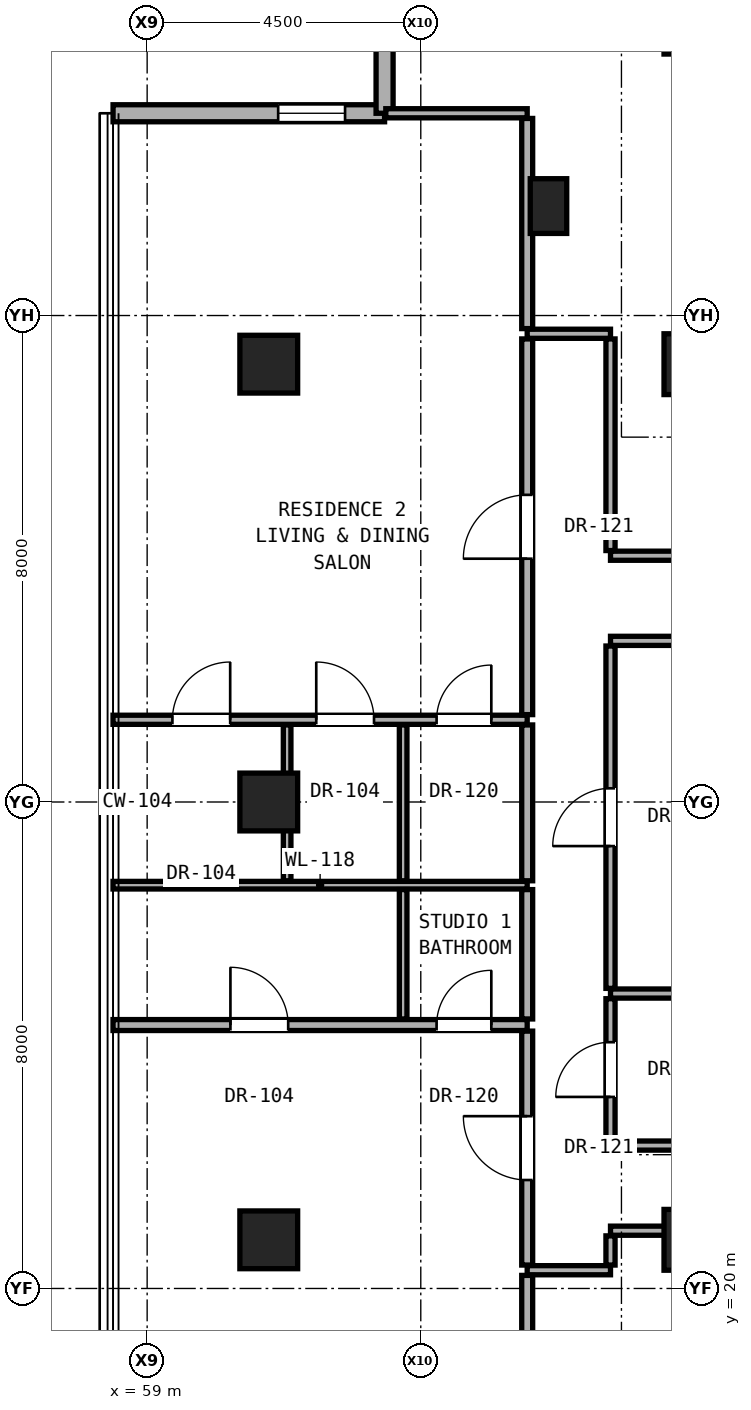
"""IFC4 building model, lengths in metres.
Left out: names, types, materials, properties, quantities, classifications, styles, units other than length and angle.
Written with IfcOpenShell. Run it as: python <this file> out.ifc"""

import sys

from ifc_helpers import new_model, si_unit, direction, frame, frame_2d, origin, origin_2d, place, context, subcontext, project, spatial, rectangle, hollow_rectangle, extrude, element, fill, save


model = new_model("IFC4")
c1 = context("Model", 3, precision=1e-05, world=origin(), true_north=direction((0.0, 1.0)))
c2 = subcontext(c1, "Body", "Model", "MODEL_VIEW")
j1 = project(units=[si_unit("LENGTHUNIT", "METRE"), si_unit("PLANEANGLEUNIT", "RADIAN")], contexts=[c1])
p1 = place(None, origin())
s1 = spatial("IfcSite", under=j1, at=p1, CompositionType="ELEMENT")
p2 = place(p1, origin())
s2 = spatial("IfcBuilding", under=s1, at=p2, CompositionType="ELEMENT")
p3 = place(p2, frame((0.0, 0.0, 173.9)))
s3 = spatial("IfcBuildingStorey", under=s2, at=p3, CompositionType="ELEMENT", Elevation=173.9)
for number, where, z_axis, x_axis in (
    (1, (68.0, 20.8, 0.0), (0.0, 0.0, 1.0), (1.0, 0.0, 0.0)),
    (2, (68.0, 35.2, 0.0), (0.0, 0.0, 1.0), (1.0, 0.0, 0.0)),
    (3, (68.0, 40.8, 0.0), (0.0, 0.0, 1.0), (1.0, 0.0, 0.0)),
):
    element("IfcColumn", number, at=place(p3, frame(where, z_axis=z_axis, x_axis=x_axis)), inside=s3, PredefinedType="COLUMN", context=c2, shape_type="SweptSolid", body=[
        extrude(rectangle(XDim=1.0, YDim=1.0, at=origin_2d()), origin(), (0.0, 0.0, 1.0), 3.25),
    ])
for number, where, z_axis, x_axis in (
    (4, (61.0, 20.8, 0.0), (0.0, 0.0, 1.0), (1.0, 0.0, 0.0)),
    (5, (61.0, 28.0, 0.0), (0.0, 0.0, 1.0), (1.0, 0.0, 0.0)),
    (6, (61.0, 35.2, 0.0), (0.0, 0.0, 1.0), (1.0, 0.0, 0.0)),
):
    element("IfcColumn", number, at=place(p3, frame(where, z_axis=z_axis, x_axis=x_axis)), inside=s3, PredefinedType="COLUMN", context=c2, shape_type="SweptSolid", body=[
        extrude(hollow_rectangle(XDim=0.95, YDim=0.95, WallThickness=0.05, at=origin_2d()), origin(), (0.0, 0.0, 1.0), 3.25),
    ])
p4 = place(p3, frame((65.6, 37.8, 0.0), z_axis=(0.0, 0.0, 1.0), x_axis=(1.0, 0.0, 0.0)))
e7 = element("IfcColumn", 7, at=p4, inside=s3, PredefinedType="PILASTER", context=c2, shape_type="SweptSolid", body=[
    extrude(rectangle(XDim=0.6, YDim=0.9, at=origin_2d()), origin(), (0.0, 0.0, 1.0), 3.25),
])
p5 = place(p3, frame((62.905, 39.326, 0.0), z_axis=(0.0, 0.0, 1.0), x_axis=(-1.0, 0.0, 0.0)))
e8 = element("IfcWall", 8, at=p5, inside=s3, PredefinedType="SOLIDWALL", context=c2, shape_type="SweptSolid", body=[
    extrude(rectangle(XDim=4.465, YDim=0.28, at=frame_2d((2.233, 0.0))), origin(), (0.0, 0.0, 1.0), 3.03),
])
p6 = place(p5, frame((0.65, 0.0, 0.85)))
e9 = element("IfcOpeningElement", 9, at=p6, cuts=e8, PredefinedType="OPENING", context=c2, shape_type="SweptSolid", body=[
    extrude(rectangle(XDim=1.1, YDim=2.0, at=frame_2d((0.55, 1.0))), frame((0.0, 0.15, 0.0), z_axis=(0.0, -1.0, 0.0), x_axis=(1.0, 0.0, 0.0)), (0.0, 0.0, 1.0), 0.3),
])
p7 = place(p3, frame((62.905, 43.791, 0.0), z_axis=(0.0, 0.0, 1.0), x_axis=(0.0, -1.0, 0.0)))
e10 = element("IfcWall", 10, at=p7, inside=s3, PredefinedType="SOLIDWALL", context=c2, shape_type="SweptSolid", body=[
    extrude(rectangle(XDim=4.465, YDim=0.28, at=frame_2d((2.232, 0.0))), origin(), (0.0, 0.0, 1.0), 3.03),
])
p8 = place(p3, frame((65.25, 20.3, 0.0), z_axis=(0.0, 0.0, 1.0), x_axis=(1.0, 0.0, 0.0)))
e11 = element("IfcWall", 11, at=p8, inside=s3, PredefinedType="PARTITIONING", context=c2, shape_type="SweptSolid", body=[
    extrude(rectangle(XDim=1.37, YDim=0.15, at=frame_2d((0.685, 0.0))), origin(), (0.0, 0.0, 1.0), 3.05),
])
p9 = place(p3, frame((66.62, 20.95, 0.0), z_axis=(0.0, 0.0, 1.0), x_axis=(1.0, 0.0, 0.0)))
e12 = element("IfcWall", 12, at=p9, inside=s3, PredefinedType="PARTITIONING", context=c2, shape_type="SweptSolid", body=[
    extrude(rectangle(XDim=1.11, YDim=0.15, at=frame_2d((0.555, 0.0))), origin(), (0.0, 0.0, 1.0), 2.442),
])
p10 = place(p3, frame((66.62, 22.35, 0.0), z_axis=(0.0, 0.0, 1.0), x_axis=(1.0, 0.0, 0.0)))
e13 = element("IfcWall", 13, at=p10, inside=s3, PredefinedType="PARTITIONING", context=c2, shape_type="SweptSolid", body=[
    extrude(rectangle(XDim=10.14, YDim=0.15, at=frame_2d((5.07, 0.0))), origin(), (0.0, 0.0, 1.0), 2.186),
])
p11 = place(p3, frame((58.439, 24.332, 0.0), z_axis=(0.0, 0.0, 1.0), x_axis=(1.0, 0.0, 0.0)))
e14 = element("IfcWall", 14, at=p11, inside=s3, PredefinedType="PARTITIONING", context=c2, shape_type="SweptSolid", body=[
    extrude(rectangle(XDim=6.811, YDim=0.18, at=frame_2d((3.406, 0.0))), origin(), (0.0, 0.0, 1.0), 2.269),
])
p12 = place(p11, frame((1.93, 0.0, 0.0)))
e15 = element("IfcOpeningElement", 15, at=p12, cuts=e14, PredefinedType="OPENING", context=c2, shape_type="SweptSolid", body=[
    extrude(rectangle(XDim=0.95, YDim=2.15, at=frame_2d((0.475, 1.075))), frame((0.0, 0.1, 0.0), z_axis=(0.0, -1.0, 0.0), x_axis=(1.0, 0.0, 0.0)), (0.0, 0.0, 1.0), 0.2),
])
p13 = place(p11, frame((5.321, 0.0, 0.0)))
e16 = element("IfcOpeningElement", 16, at=p13, cuts=e14, PredefinedType="OPENING", context=c2, shape_type="SweptSolid", body=[
    extrude(rectangle(XDim=0.9, YDim=2.1, at=frame_2d((0.45, 1.05))), frame((0.0, 0.1, 0.0), z_axis=(0.0, -1.0, 0.0), x_axis=(1.0, 0.0, 0.0)), (0.0, 0.0, 1.0), 0.2),
])
p14 = place(p3, frame((66.62, 24.85, 0.0), z_axis=(0.0, 0.0, 1.0), x_axis=(1.0, 0.0, 0.0)))
e17 = element("IfcWall", 17, at=p14, inside=s3, PredefinedType="PARTITIONING", context=c2, shape_type="SweptSolid", body=[
    extrude(rectangle(XDim=3.13, YDim=0.15, at=frame_2d((1.565, 0.0))), origin(), (0.0, 0.0, 1.0), 2.186),
])
p15 = place(p3, frame((58.439, 26.632, 0.0), z_axis=(0.0, 0.0, 1.0), x_axis=(1.0, 0.0, 0.0)))
e18 = element("IfcWall", 18, at=p15, inside=s3, PredefinedType="PARTITIONING", context=c2, shape_type="SweptSolid", body=[
    extrude(rectangle(XDim=6.811, YDim=0.125, at=frame_2d((3.406, 0.0))), origin(), (0.0, 0.0, 1.0), 2.269),
])
p16 = place(p3, frame((58.439, 29.352, 0.0), z_axis=(0.0, 0.0, 1.0), x_axis=(1.0, 0.0, 0.0)))
e19 = element("IfcWall", 19, at=p16, inside=s3, PredefinedType="PARTITIONING", context=c2, shape_type="SweptSolid", body=[
    extrude(rectangle(XDim=6.811, YDim=0.15, at=frame_2d((3.406, 0.0))), origin(), (0.0, 0.0, 1.0), 2.269),
])
p17 = place(p16, frame((0.977, 0.0, 0.0)))
e20 = element("IfcOpeningElement", 20, at=p17, cuts=e19, PredefinedType="OPENING", context=c2, shape_type="SweptSolid", body=[
    extrude(rectangle(XDim=0.95, YDim=2.15, at=frame_2d((0.475, 1.075))), frame((0.0, 0.085, 0.0), z_axis=(0.0, -1.0, 0.0), x_axis=(1.0, 0.0, 0.0)), (0.0, 0.0, 1.0), 0.17),
])
p18 = place(p16, frame((3.342, 0.0, 0.0)))
e21 = element("IfcOpeningElement", 21, at=p18, cuts=e19, PredefinedType="OPENING", context=c2, shape_type="SweptSolid", body=[
    extrude(rectangle(XDim=0.95, YDim=2.15, at=frame_2d((0.475, 1.075))), frame((0.0, 0.085, 0.0), z_axis=(0.0, -1.0, 0.0), x_axis=(1.0, 0.0, 0.0)), (0.0, 0.0, 1.0), 0.17),
])
p19 = place(p16, frame((5.321, 0.0, 0.0)))
e22 = element("IfcOpeningElement", 22, at=p19, cuts=e19, PredefinedType="OPENING", context=c2, shape_type="SweptSolid", body=[
    extrude(rectangle(XDim=0.9, YDim=2.1, at=frame_2d((0.45, 1.05))), frame((0.0, 0.085, 0.0), z_axis=(0.0, -1.0, 0.0), x_axis=(1.0, 0.0, 0.0)), (0.0, 0.0, 1.0), 0.17),
])
p20 = place(p3, frame((66.62, 30.65, 0.0), z_axis=(0.0, 0.0, 1.0), x_axis=(1.0, 0.0, 0.0)))
e23 = element("IfcWall", 23, at=p20, inside=s3, PredefinedType="PARTITIONING", context=c2, shape_type="SweptSolid", body=[
    extrude(rectangle(XDim=10.14, YDim=0.15, at=frame_2d((5.07, 0.0))), origin(), (0.0, 0.0, 1.0), 2.186),
])
p21 = place(p20, frame((6.14, 0.0, 0.0)))
e24 = element("IfcOpeningElement", 24, at=p21, cuts=e23, PredefinedType="OPENING", context=c2, shape_type="SweptSolid", body=[
    extrude(rectangle(XDim=0.95, YDim=2.15, at=frame_2d((0.475, 1.075))), frame((0.0, 0.085, 0.0), z_axis=(0.0, -1.0, 0.0), x_axis=(1.0, 0.0, 0.0)), (0.0, 0.0, 1.0), 0.17),
])
p22 = place(p3, frame((66.62, 32.05, 0.0), z_axis=(0.0, 0.0, 1.0), x_axis=(1.0, 0.0, 0.0)))
e25 = element("IfcWall", 25, at=p22, inside=s3, PredefinedType="PARTITIONING", context=c2, shape_type="SweptSolid", body=[
    extrude(rectangle(XDim=2.18, YDim=0.15, at=frame_2d((1.09, 0.0))), origin(), (0.0, 0.0, 1.0), 2.186),
])
p23 = place(p3, frame((65.25, 35.7, 0.0), z_axis=(0.0, 0.0, 1.0), x_axis=(1.0, 0.0, 0.0)))
e26 = element("IfcWall", 26, at=p23, inside=s3, PredefinedType="PARTITIONING", context=c2, shape_type="SweptSolid", body=[
    extrude(rectangle(XDim=1.37, YDim=0.15, at=frame_2d((0.685, 0.0))), origin(), (0.0, 0.0, 1.0), 3.05),
])
p24 = place(p3, frame((62.925, 39.326, 0.0), z_axis=(0.0, 0.0, 1.0), x_axis=(1.0, 0.0, 0.0)))
e27 = element("IfcWall", 27, at=p24, inside=s3, PredefinedType="PARTITIONING", context=c2, shape_type="SweptSolid", body=[
    extrude(rectangle(XDim=2.325, YDim=0.15, at=frame_2d((1.163, 0.0))), origin(), (0.0, 0.0, 1.0), 3.05),
])
p25 = place(p3, frame((61.302, 26.705, 0.0), z_axis=(0.0, 0.0, 1.0), x_axis=(0.0, 1.0, 0.0)))
e28 = element("IfcWall", 28, at=p25, inside=s3, PredefinedType="PARTITIONING", context=c2, shape_type="SweptSolid", body=[
    extrude(rectangle(XDim=2.562, YDim=0.125, at=frame_2d((1.281, 0.0))), origin(), (0.0, 0.0, 1.0), 2.346),
])
p26 = place(p3, frame((63.21, 24.432, 0.0), z_axis=(0.0, 0.0, 1.0), x_axis=(0.0, 1.0, 0.0)))
e29 = element("IfcWall", 29, at=p26, inside=s3, PredefinedType="PARTITIONING", context=c2, shape_type="SweptSolid", body=[
    extrude(rectangle(XDim=2.128, YDim=0.125, at=frame_2d((1.064, 0.0))), origin(), (0.0, 0.0, 1.0), 3.05),
])
p27 = place(p3, frame((63.21, 26.705, 0.0), z_axis=(0.0, 0.0, 1.0), x_axis=(0.0, 1.0, 0.0)))
e30 = element("IfcWall", 30, at=p27, inside=s3, PredefinedType="PARTITIONING", context=c2, shape_type="SweptSolid", body=[
    extrude(rectangle(XDim=2.562, YDim=0.125, at=frame_2d((1.281, 0.0))), origin(), (0.0, 0.0, 1.0), 2.346),
])
p28 = place(p3, frame((65.25, 16.774, 0.0), z_axis=(0.0, 0.0, 1.0), x_axis=(0.0, 1.0, 0.0)))
e31 = element("IfcWall", 31, at=p28, inside=s3, PredefinedType="PARTITIONING", context=c2, shape_type="SweptSolid", body=[
    extrude(rectangle(XDim=3.441, YDim=0.18, at=frame_2d((1.721, 0.0))), origin(), (0.0, 0.0, 1.0), 2.493),
])
p29 = place(p3, frame((65.25, 20.385, 0.0), z_axis=(0.0, 0.0, 1.0), x_axis=(0.0, 1.0, 0.0)))
e32 = element("IfcWall", 32, at=p29, inside=s3, PredefinedType="PARTITIONING", context=c2, shape_type="SweptSolid", body=[
    extrude(rectangle(XDim=3.847, YDim=0.18, at=frame_2d((1.923, 0.0))), origin(), (0.0, 0.0, 1.0), 2.442),
])
p30 = place(p29, frame((1.398, 0.0, 0.0)))
e33 = element("IfcOpeningElement", 33, at=p30, cuts=e32, PredefinedType="OPENING", context=c2, shape_type="SweptSolid", body=[
    extrude(rectangle(XDim=1.05, YDim=2.2, at=frame_2d((0.525, 1.1))), frame((0.0, 0.1, 0.0), z_axis=(0.0, -1.0, 0.0), x_axis=(1.0, 0.0, 0.0)), (0.0, 0.0, 1.0), 0.2),
])
p31 = place(p3, frame((65.25, 24.432, 0.0), z_axis=(0.0, 0.0, 1.0), x_axis=(0.0, 1.0, 0.0)))
e34 = element("IfcWall", 34, at=p31, inside=s3, PredefinedType="PARTITIONING", context=c2, shape_type="SweptSolid", body=[
    extrude(rectangle(XDim=2.128, YDim=0.18, at=frame_2d((1.064, 0.0))), origin(), (0.0, 0.0, 1.0), 3.05),
])
p32 = place(p3, frame((65.25, 26.705, 0.0), z_axis=(0.0, 0.0, 1.0), x_axis=(0.0, 1.0, 0.0)))
e35 = element("IfcWall", 35, at=p32, inside=s3, PredefinedType="PARTITIONING", context=c2, shape_type="SweptSolid", body=[
    extrude(rectangle(XDim=2.562, YDim=0.18, at=frame_2d((1.281, 0.0))), origin(), (0.0, 0.0, 1.0), 2.346),
])
p33 = place(p3, frame((65.25, 29.437, 0.0), z_axis=(0.0, 0.0, 1.0), x_axis=(0.0, 1.0, 0.0)))
e36 = element("IfcWall", 36, at=p33, inside=s3, PredefinedType="PARTITIONING", context=c2, shape_type="SweptSolid", body=[
    extrude(rectangle(XDim=6.178, YDim=0.18, at=frame_2d((3.089, 0.0))), origin(), (0.0, 0.0, 1.0), 2.442),
])
p34 = place(p33, frame((2.564, 0.0, 0.0)))
e37 = element("IfcOpeningElement", 37, at=p34, cuts=e36, PredefinedType="OPENING", context=c2, shape_type="SweptSolid", body=[
    extrude(rectangle(XDim=1.05, YDim=2.2, at=frame_2d((0.525, 1.1))), frame((0.0, 0.1, 0.0), z_axis=(0.0, -1.0, 0.0), x_axis=(1.0, 0.0, 0.0)), (0.0, 0.0, 1.0), 0.2),
])
p35 = place(p3, frame((65.25, 35.785, 0.0), z_axis=(0.0, 0.0, 1.0), x_axis=(0.0, 1.0, 0.0)))
e38 = element("IfcWall", 38, at=p35, inside=s3, PredefinedType="PARTITIONING", context=c2, shape_type="SweptSolid", body=[
    extrude(rectangle(XDim=3.456, YDim=0.18, at=frame_2d((1.728, 0.0))), origin(), (0.0, 0.0, 1.0), 2.493),
])
p36 = place(p3, frame((66.62, 20.385, 0.0), z_axis=(0.0, 0.0, 1.0), x_axis=(0.0, 1.0, 0.0)))
e39 = element("IfcWall", 39, at=p36, inside=s3, PredefinedType="PARTITIONING", context=c2, shape_type="SweptSolid", body=[
    extrude(rectangle(XDim=0.48, YDim=0.15, at=frame_2d((0.24, 0.0))), origin(), (0.0, 0.0, 1.0), 2.442),
])
p37 = place(p3, frame((66.62, 22.435, 0.0), z_axis=(0.0, 0.0, 1.0), x_axis=(0.0, 1.0, 0.0)))
e40 = element("IfcWall", 40, at=p37, inside=s3, PredefinedType="PARTITIONING", context=c2, shape_type="SweptSolid", body=[
    extrude(rectangle(XDim=2.33, YDim=0.15, at=frame_2d((1.165, 0.0))), origin(), (0.0, 0.0, 1.0), 3.05),
])
p38 = place(p37, frame((0.715, 0.0, 0.0)))
e41 = element("IfcOpeningElement", 41, at=p38, cuts=e40, PredefinedType="OPENING", context=c2, shape_type="SweptSolid", body=[
    extrude(rectangle(XDim=0.9, YDim=2.1, at=frame_2d((0.45, 1.05))), frame((0.0, 0.085, 0.0), z_axis=(0.0, -1.0, 0.0), x_axis=(1.0, 0.0, 0.0)), (0.0, 0.0, 1.0), 0.17),
])
p39 = place(p3, frame((66.62, 24.935, 0.0), z_axis=(0.0, 0.0, 1.0), x_axis=(0.0, 1.0, 0.0)))
e42 = element("IfcWall", 42, at=p39, inside=s3, PredefinedType="PARTITIONING", context=c2, shape_type="SweptSolid", body=[
    extrude(rectangle(XDim=5.63, YDim=0.15, at=frame_2d((2.815, 0.0))), origin(), (0.0, 0.0, 1.0), 2.346),
])
p40 = place(p39, frame((2.34, 0.0, 0.0)))
e43 = element("IfcOpeningElement", 43, at=p40, cuts=e42, PredefinedType="OPENING", context=c2, shape_type="SweptSolid", body=[
    extrude(rectangle(XDim=0.95, YDim=2.15, at=frame_2d((0.475, 1.075))), frame((0.0, 0.085, 0.0), z_axis=(0.0, -1.0, 0.0), x_axis=(1.0, 0.0, 0.0)), (0.0, 0.0, 1.0), 0.17),
])
p41 = place(p3, frame((66.62, 32.135, 0.0), z_axis=(0.0, 0.0, 1.0), x_axis=(0.0, 1.0, 0.0)))
e44 = element("IfcWall", 44, at=p41, inside=s3, PredefinedType="PARTITIONING", context=c2, shape_type="SweptSolid", body=[
    extrude(rectangle(XDim=3.48, YDim=0.15, at=frame_2d((1.74, 0.0))), origin(), (0.0, 0.0, 1.0), 2.442),
])
p42 = place(p6, origin())
e45 = element("IfcWindow", 45, at=p42, inside=s3, PartitioningType="SINGLE_PANEL", PredefinedType="WINDOW", context=c2, shape_type="SweptSolid", body=[
    extrude(rectangle(XDim=1.1, YDim=2.0, at=frame_2d((0.55, 1.0))), frame((0.0, 0.03, 0.0), z_axis=(0.0, -1.0, 0.0), x_axis=(1.0, 0.0, 0.0)), (0.0, 0.0, 1.0), 0.06),
])
fill(e9, e45)
p43 = place(p38, origin())
e46 = element("IfcDoor", 46, at=p43, inside=s3, OperationType="SINGLE_SWING_LEFT", PredefinedType="DOOR", context=c2, shape_type="SweptSolid", body=[
    extrude(rectangle(XDim=0.9, YDim=2.1, at=frame_2d((0.45, 1.05))), frame((0.0, 0.025, 0.0), z_axis=(0.0, -1.0, 0.0), x_axis=(1.0, 0.0, 0.0)), (0.0, 0.0, 1.0), 0.05),
])
fill(e41, e46)
p44 = place(p30, origin())
e47 = element("IfcDoor", 47, at=p44, inside=s3, OperationType="SINGLE_SWING_RIGHT", PredefinedType="DOOR", context=c2, shape_type="SweptSolid", body=[
    extrude(rectangle(XDim=1.05, YDim=2.2, at=frame_2d((0.525, 1.1))), frame((0.0, 0.025, 0.0), z_axis=(0.0, -1.0, 0.0), x_axis=(1.0, 0.0, 0.0)), (0.0, 0.0, 1.0), 0.05),
])
fill(e33, e47)
p45 = place(p12, origin())
e48 = element("IfcDoor", 48, at=p45, inside=s3, OperationType="SINGLE_SWING_LEFT", PredefinedType="DOOR", context=c2, shape_type="SweptSolid", body=[
    extrude(rectangle(XDim=0.95, YDim=2.15, at=frame_2d((0.475, 1.075))), frame((0.0, 0.025, 0.0), z_axis=(0.0, -1.0, 0.0), x_axis=(1.0, 0.0, 0.0)), (0.0, 0.0, 1.0), 0.05),
])
fill(e15, e48)
p46 = place(p13, origin())
e49 = element("IfcDoor", 49, at=p46, inside=s3, OperationType="SINGLE_SWING_RIGHT", PredefinedType="DOOR", context=c2, shape_type="SweptSolid", body=[
    extrude(rectangle(XDim=0.9, YDim=2.1, at=frame_2d((0.45, 1.05))), frame((0.0, 0.025, 0.0), z_axis=(0.0, -1.0, 0.0), x_axis=(1.0, 0.0, 0.0)), (0.0, 0.0, 1.0), 0.05),
])
fill(e16, e49)
p47 = place(p34, origin())
e50 = element("IfcDoor", 50, at=p47, inside=s3, OperationType="SINGLE_SWING_LEFT", PredefinedType="DOOR", context=c2, shape_type="SweptSolid", body=[
    extrude(rectangle(XDim=1.05, YDim=2.2, at=frame_2d((0.525, 1.1))), frame((0.0, 0.025, 0.0), z_axis=(0.0, -1.0, 0.0), x_axis=(1.0, 0.0, 0.0)), (0.0, 0.0, 1.0), 0.05),
])
fill(e37, e50)
p48 = place(p17, origin())
e51 = element("IfcDoor", 51, at=p48, inside=s3, OperationType="SINGLE_SWING_RIGHT", PredefinedType="DOOR", context=c2, shape_type="SweptSolid", body=[
    extrude(rectangle(XDim=0.95, YDim=2.15, at=frame_2d((0.475, 1.075))), frame((0.0, 0.025, 0.0), z_axis=(0.0, -1.0, 0.0), x_axis=(1.0, 0.0, 0.0)), (0.0, 0.0, 1.0), 0.05),
])
fill(e20, e51)
p49 = place(p18, origin())
e52 = element("IfcDoor", 52, at=p49, inside=s3, OperationType="SINGLE_SWING_LEFT", PredefinedType="DOOR", context=c2, shape_type="SweptSolid", body=[
    extrude(rectangle(XDim=0.95, YDim=2.15, at=frame_2d((0.475, 1.075))), frame((0.0, 0.025, 0.0), z_axis=(0.0, -1.0, 0.0), x_axis=(1.0, 0.0, 0.0)), (0.0, 0.0, 1.0), 0.05),
])
fill(e21, e52)
p50 = place(p19, origin())
e53 = element("IfcDoor", 53, at=p50, inside=s3, OperationType="SINGLE_SWING_RIGHT", PredefinedType="DOOR", context=c2, shape_type="SweptSolid", body=[
    extrude(rectangle(XDim=0.9, YDim=2.1, at=frame_2d((0.45, 1.05))), frame((0.0, 0.025, 0.0), z_axis=(0.0, -1.0, 0.0), x_axis=(1.0, 0.0, 0.0)), (0.0, 0.0, 1.0), 0.05),
])
fill(e22, e53)
p51 = place(p40, origin())
e54 = element("IfcDoor", 54, at=p51, inside=s3, OperationType="SINGLE_SWING_LEFT", PredefinedType="DOOR", context=c2, shape_type="SweptSolid", body=[
    extrude(rectangle(XDim=0.95, YDim=2.15, at=frame_2d((0.475, 1.075))), frame((0.0, 0.025, 0.0), z_axis=(0.0, -1.0, 0.0), x_axis=(1.0, 0.0, 0.0)), (0.0, 0.0, 1.0), 0.05),
])
fill(e43, e54)
save(model, sys.argv[1])
